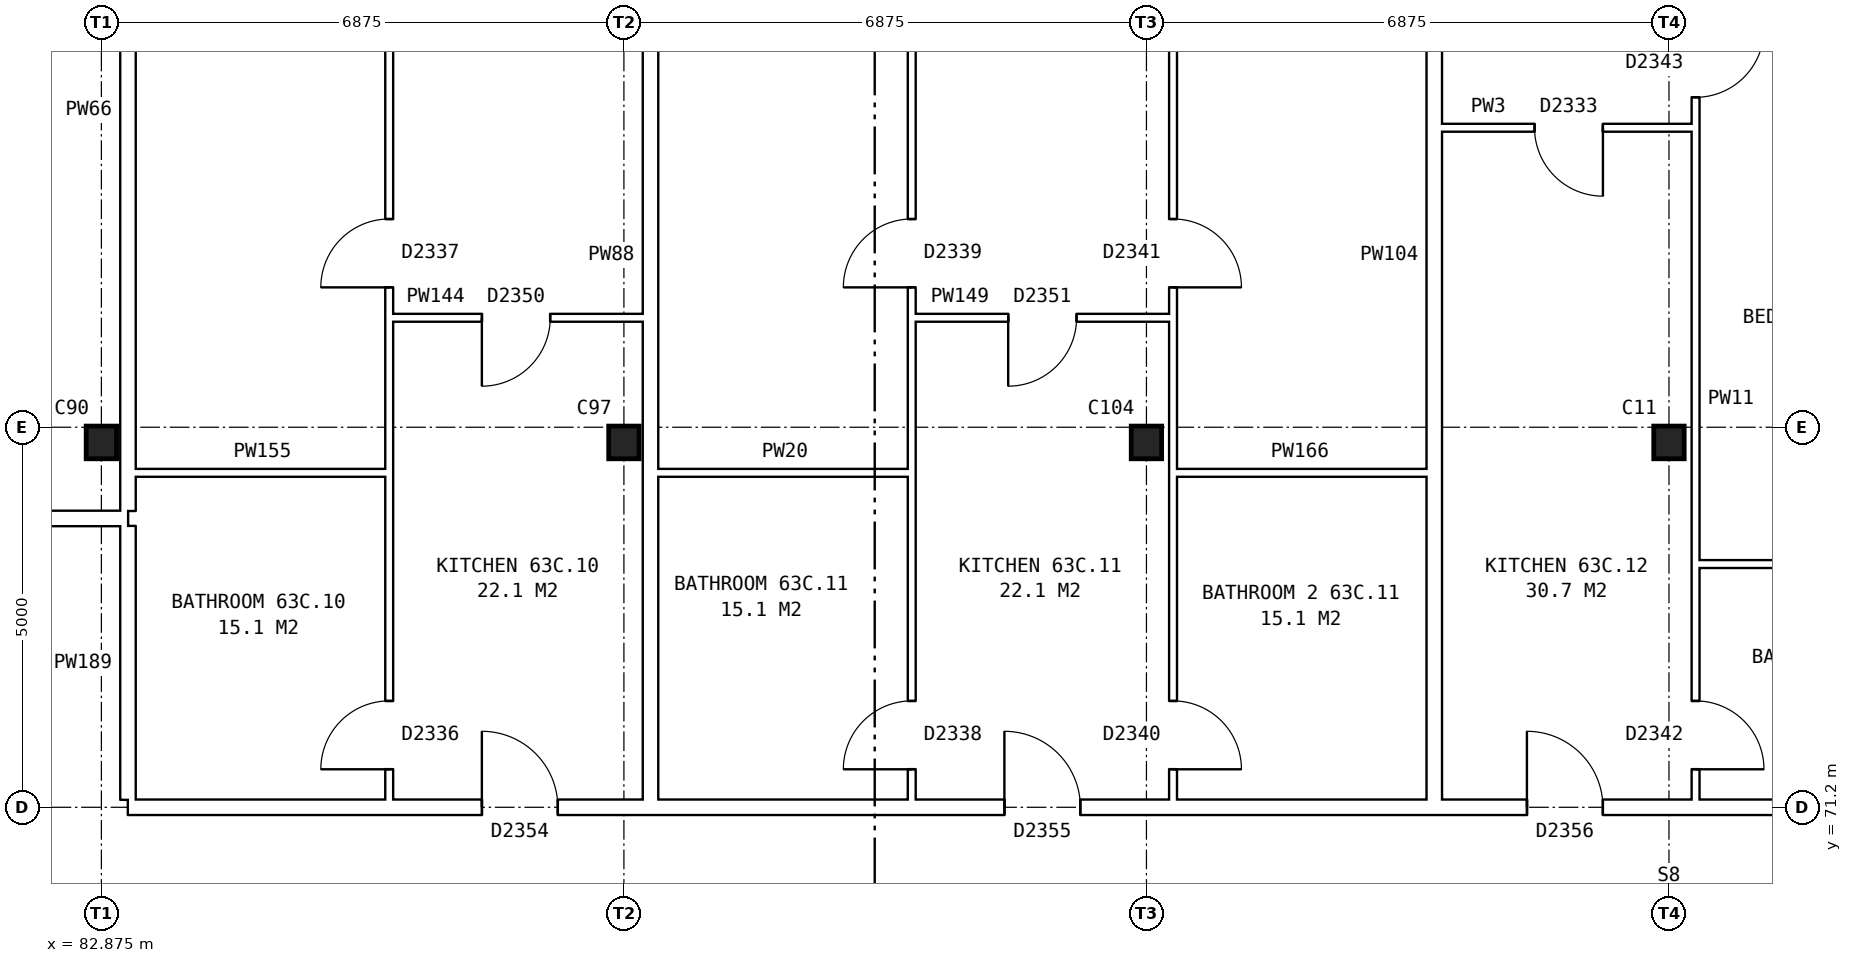
"""IFC4 building model, lengths in metres.
Left out: names, types, materials, properties, quantities, classifications, styles, units other than length and angle.
Written with IfcOpenShell. Run it as: python <this file> out.ifc"""

import sys

from ifc_helpers import new_model, si_unit, direction, frame, frame_2d, origin, origin_2d, place, context, subcontext, project, spatial, rectangle, i_section, extrude, element, fill, save


model = new_model("IFC4")
c1 = context("Model", 3, precision=1e-05, world=origin(), true_north=direction((0.0, 1.0)))
c2 = subcontext(c1, "Body", "Model", "MODEL_VIEW")
j1 = project(units=[si_unit("LENGTHUNIT", "METRE"), si_unit("PLANEANGLEUNIT", "RADIAN")], contexts=[c1])
p1 = place(None, origin())
s1 = spatial("IfcSite", under=j1, at=p1, CompositionType="ELEMENT")
p2 = place(p1, origin())
s2 = spatial("IfcBuilding", under=s1, at=p2, CompositionType="ELEMENT")
p3 = place(p2, frame((0.0, 0.0, 224.5)))
s3 = spatial("IfcBuildingStorey", under=s2, at=p3, CompositionType="ELEMENT", Elevation=224.5)
for number, where, z_axis, x_axis in (
    (1, (82.875, 76.0, 0.0), (0.0, 0.0, 1.0), (1.0, 0.0, 0.0)),
    (2, (89.75, 76.0, 0.0), (0.0, 0.0, 1.0), (1.0, 0.0, 0.0)),
    (3, (96.625, 76.0, 0.0), (0.0, 0.0, 1.0), (1.0, 0.0, 0.0)),
    (4, (103.5, 76.0, 0.0), (0.0, 0.0, 1.0), (1.0, 0.0, 0.0)),
):
    element("IfcColumn", number, at=place(p3, frame(where, z_axis=z_axis, x_axis=x_axis)), inside=s3, PredefinedType="COLUMN", context=c2, shape_type="SweptSolid", body=[
        extrude(i_section(OverallWidth=0.4, OverallDepth=0.43, WebThickness=0.04, FlangeThickness=0.04, at=origin_2d()), origin(), (0.0, 0.0, 1.0), 2.85),
    ])
p4 = place(p3, frame((83.225, 71.2, 0.0), z_axis=(0.0, 0.0, 1.0), x_axis=(1.0, 0.0, 0.0)))
e5 = element("IfcWall", 5, at=p4, inside=s3, PredefinedType="PARTITIONING", context=c2, shape_type="SweptSolid", body=[
    extrude(rectangle(XDim=41.25, YDim=0.2, at=frame_2d((20.625, 0.0))), origin(), (0.0, 0.0, 1.0), 2.85),
])
p5 = place(p4, frame((4.656, 0.0, 0.0)))
e6 = element("IfcOpeningElement", 6, at=p5, cuts=e5, PredefinedType="OPENING", context=c2, shape_type="SweptSolid", body=[
    extrude(rectangle(XDim=1.0, YDim=2.1, at=frame_2d((0.5, 1.05))), frame((0.0, 0.11, 0.0), z_axis=(0.0, -1.0, 0.0), x_axis=(1.0, 0.0, 0.0)), (0.0, 0.0, 1.0), 0.22),
])
p6 = place(p4, frame((11.531, 0.0, 0.0)))
e7 = element("IfcOpeningElement", 7, at=p6, cuts=e5, PredefinedType="OPENING", context=c2, shape_type="SweptSolid", body=[
    extrude(rectangle(XDim=1.0, YDim=2.1, at=frame_2d((0.5, 1.05))), frame((0.0, 0.11, 0.0), z_axis=(0.0, -1.0, 0.0), x_axis=(1.0, 0.0, 0.0)), (0.0, 0.0, 1.0), 0.22),
])
p7 = place(p4, frame((18.406, 0.0, 0.0)))
e8 = element("IfcOpeningElement", 8, at=p7, cuts=e5, PredefinedType="OPENING", context=c2, shape_type="SweptSolid", body=[
    extrude(rectangle(XDim=1.0, YDim=2.1, at=frame_2d((0.5, 1.05))), frame((0.0, 0.11, 0.0), z_axis=(0.0, -1.0, 0.0), x_axis=(1.0, 0.0, 0.0)), (0.0, 0.0, 1.0), 0.22),
])
p8 = place(p4, frame((28.719, 0.0, 0.0)))
e9 = element("IfcOpeningElement", 9, at=p8, cuts=e5, PredefinedType="OPENING", context=c2, shape_type="SweptSolid", body=[
    extrude(rectangle(XDim=1.0, YDim=2.1, at=frame_2d((0.5, 1.05))), frame((0.0, 0.11, 0.0), z_axis=(0.0, -1.0, 0.0), x_axis=(1.0, 0.0, 0.0)), (0.0, 0.0, 1.0), 0.22),
])
p9 = place(p4, frame((35.594, 0.0, 0.0)))
e10 = element("IfcOpeningElement", 10, at=p9, cuts=e5, PredefinedType="OPENING", context=c2, shape_type="SweptSolid", body=[
    extrude(rectangle(XDim=1.0, YDim=2.1, at=frame_2d((0.5, 1.05))), frame((0.0, 0.11, 0.0), z_axis=(0.0, -1.0, 0.0), x_axis=(1.0, 0.0, 0.0)), (0.0, 0.0, 1.0), 0.22),
])
p10 = place(p3, frame((103.85, 74.4, 0.0), z_axis=(0.0, 0.0, 1.0), x_axis=(1.0, 0.0, 0.0)))
e11 = element("IfcWall", 11, at=p10, inside=s3, PredefinedType="PARTITIONING", context=c2, shape_type="SweptSolid", body=[
    extrude(rectangle(XDim=6.875, YDim=0.1, at=frame_2d((3.438, 0.0))), origin(), (0.0, 0.0, 1.0), 2.85),
])
p11 = place(p3, frame((75.64, 75.0, 0.0), z_axis=(0.0, 0.0, 1.0), x_axis=(1.0, 0.0, 0.0)))
e12 = element("IfcWall", 12, at=p11, inside=s3, PredefinedType="PARTITIONING", context=c2, shape_type="SweptSolid", body=[
    extrude(rectangle(XDim=7.585, YDim=0.2, at=frame_2d((3.792, 0.0))), origin(), (0.0, 0.0, 1.0), 2.85),
])
p12 = place(p11, frame((3.343, 0.0, 0.0)))
e13 = element("IfcOpeningElement", 13, at=p12, cuts=e12, PredefinedType="OPENING", context=c2, shape_type="SweptSolid", body=[
    extrude(rectangle(XDim=0.9, YDim=2.1, at=frame_2d((0.45, 1.05))), frame((0.0, 0.11, 0.0), z_axis=(0.0, -1.0, 0.0), x_axis=(1.0, 0.0, 0.0)), (0.0, 0.0, 1.0), 0.22),
])
for number, where, z_axis, x_axis in (
    (14, (83.325, 75.6, 0.0), (0.0, 0.0, 1.0), (1.0, 0.0, 0.0)),
    (15, (90.2, 75.6, 0.0), (0.0, 0.0, 1.0), (1.0, 0.0, 0.0)),
):
    element("IfcWall", number, at=place(p3, frame(where, z_axis=z_axis, x_axis=x_axis)), inside=s3, PredefinedType="PARTITIONING", context=c2, shape_type="SweptSolid", body=[
        extrude(rectangle(XDim=3.337, YDim=0.1, at=frame_2d((1.668, 0.0))), origin(), (0.0, 0.0, 1.0), 2.85),
    ])
p13 = place(p3, frame((96.975, 75.6, 0.0), z_axis=(0.0, 0.0, 1.0), x_axis=(1.0, 0.0, 0.0)))
e16 = element("IfcWall", 16, at=p13, inside=s3, PredefinedType="PARTITIONING", context=c2, shape_type="SweptSolid", body=[
    extrude(rectangle(XDim=3.337, YDim=0.1, at=frame_2d((1.668, 0.0))), origin(), (0.0, 0.0, 1.0), 2.85),
])
p14 = place(p3, frame((86.662, 77.64, 0.0), z_axis=(0.0, 0.0, 1.0), x_axis=(1.0, 0.0, 0.0)))
e17 = element("IfcWall", 17, at=p14, inside=s3, PredefinedType="PARTITIONING", context=c2, shape_type="SweptSolid", body=[
    extrude(rectangle(XDim=3.338, YDim=0.1, at=frame_2d((1.669, 0.0))), origin(), (0.0, 0.0, 1.0), 2.85),
])
p15 = place(p14, frame((1.219, 0.0, 0.0)))
e18 = element("IfcOpeningElement", 18, at=p15, cuts=e17, PredefinedType="OPENING", context=c2, shape_type="SweptSolid", body=[
    extrude(rectangle(XDim=0.9, YDim=2.1, at=frame_2d((0.45, 1.05))), frame((0.0, 0.06, 0.0), z_axis=(0.0, -1.0, 0.0), x_axis=(1.0, 0.0, 0.0)), (0.0, 0.0, 1.0), 0.12),
])
p16 = place(p3, frame((93.537, 77.64, 0.0), z_axis=(0.0, 0.0, 1.0), x_axis=(1.0, 0.0, 0.0)))
e19 = element("IfcWall", 19, at=p16, inside=s3, PredefinedType="PARTITIONING", context=c2, shape_type="SweptSolid", body=[
    extrude(rectangle(XDim=3.438, YDim=0.1, at=frame_2d((1.719, 0.0))), origin(), (0.0, 0.0, 1.0), 2.85),
])
p17 = place(p16, frame((1.269, 0.0, 0.0)))
e20 = element("IfcOpeningElement", 20, at=p17, cuts=e19, PredefinedType="OPENING", context=c2, shape_type="SweptSolid", body=[
    extrude(rectangle(XDim=0.9, YDim=2.1, at=frame_2d((0.45, 1.05))), frame((0.0, 0.06, 0.0), z_axis=(0.0, -1.0, 0.0), x_axis=(1.0, 0.0, 0.0)), (0.0, 0.0, 1.0), 0.12),
])
p18 = place(p3, frame((100.512, 80.14, 0.0), z_axis=(0.0, 0.0, 1.0), x_axis=(1.0, 0.0, 0.0)))
e21 = element("IfcWall", 21, at=p18, inside=s3, PredefinedType="PARTITIONING", context=c2, shape_type="SweptSolid", body=[
    extrude(rectangle(XDim=3.338, YDim=0.1, at=frame_2d((1.669, 0.0))), origin(), (0.0, 0.0, 1.0), 2.85),
])
p19 = place(p18, frame((1.219, 0.0, 0.0)))
e22 = element("IfcOpeningElement", 22, at=p19, cuts=e21, PredefinedType="OPENING", context=c2, shape_type="SweptSolid", body=[
    extrude(rectangle(XDim=0.9, YDim=2.1, at=frame_2d((0.45, 1.05))), frame((0.0, 0.06, 0.0), z_axis=(0.0, -1.0, 0.0), x_axis=(1.0, 0.0, 0.0)), (0.0, 0.0, 1.0), 0.12),
])
p20 = place(p3, frame((83.225, 71.3, 0.0), z_axis=(0.0, 0.0, 1.0), x_axis=(0.0, 1.0, 0.0)))
e23 = element("IfcWall", 23, at=p20, inside=s3, PredefinedType="PARTITIONING", context=c2, shape_type="SweptSolid", body=[
    extrude(rectangle(XDim=3.6, YDim=0.2, at=frame_2d((1.8, 0.0))), origin(), (0.0, 0.0, 1.0), 2.85),
])
p21 = place(p3, frame((83.225, 75.1, 0.0), z_axis=(0.0, 0.0, 1.0), x_axis=(0.0, 1.0, 0.0)))
e24 = element("IfcWall", 24, at=p21, inside=s3, PredefinedType="PARTITIONING", context=c2, shape_type="SweptSolid", body=[
    extrude(rectangle(XDim=10.54, YDim=0.2, at=frame_2d((5.27, 0.0))), origin(), (0.0, 0.0, 1.0), 2.85),
])
p22 = place(p3, frame((86.662, 71.3, 0.0), z_axis=(0.0, 0.0, 1.0), x_axis=(0.0, 1.0, 0.0)))
e25 = element("IfcWall", 25, at=p22, inside=s3, PredefinedType="PARTITIONING", context=c2, shape_type="SweptSolid", body=[
    extrude(rectangle(XDim=14.34, YDim=0.1, at=frame_2d((7.17, 0.0))), origin(), (0.0, 0.0, 1.0), 2.85),
])
p23 = place(p22, frame((6.74, 0.0, 0.0)))
e26 = element("IfcOpeningElement", 26, at=p23, cuts=e25, PredefinedType="OPENING", context=c2, shape_type="SweptSolid", body=[
    extrude(rectangle(XDim=0.9, YDim=2.1, at=frame_2d((0.45, 1.05))), frame((0.0, 0.06, 0.0), z_axis=(0.0, -1.0, 0.0), x_axis=(1.0, 0.0, 0.0)), (0.0, 0.0, 1.0), 0.12),
])
p24 = place(p22, frame((0.4, 0.0, 0.0)))
e27 = element("IfcOpeningElement", 27, at=p24, cuts=e25, PredefinedType="OPENING", context=c2, shape_type="SweptSolid", body=[
    extrude(rectangle(XDim=0.9, YDim=2.1, at=frame_2d((0.45, 1.05))), frame((0.0, 0.06, 0.0), z_axis=(0.0, -1.0, 0.0), x_axis=(1.0, 0.0, 0.0)), (0.0, 0.0, 1.0), 0.12),
])
p25 = place(p3, frame((90.1, 71.3, 0.0), z_axis=(0.0, 0.0, 1.0), x_axis=(0.0, 1.0, 0.0)))
e28 = element("IfcWall", 28, at=p25, inside=s3, PredefinedType="PARTITIONING", context=c2, shape_type="SweptSolid", body=[
    extrude(rectangle(XDim=14.34, YDim=0.2, at=frame_2d((7.17, 0.0))), origin(), (0.0, 0.0, 1.0), 2.85),
])
p26 = place(p3, frame((93.537, 71.3, 0.0), z_axis=(0.0, 0.0, 1.0), x_axis=(0.0, 1.0, 0.0)))
e29 = element("IfcWall", 29, at=p26, inside=s3, PredefinedType="PARTITIONING", context=c2, shape_type="SweptSolid", body=[
    extrude(rectangle(XDim=14.34, YDim=0.1, at=frame_2d((7.17, 0.0))), origin(), (0.0, 0.0, 1.0), 2.85),
])
p27 = place(p26, frame((6.74, 0.0, 0.0)))
e30 = element("IfcOpeningElement", 30, at=p27, cuts=e29, PredefinedType="OPENING", context=c2, shape_type="SweptSolid", body=[
    extrude(rectangle(XDim=0.9, YDim=2.1, at=frame_2d((0.45, 1.05))), frame((0.0, 0.06, 0.0), z_axis=(0.0, -1.0, 0.0), x_axis=(1.0, 0.0, 0.0)), (0.0, 0.0, 1.0), 0.12),
])
p28 = place(p26, frame((0.4, 0.0, 0.0)))
e31 = element("IfcOpeningElement", 31, at=p28, cuts=e29, PredefinedType="OPENING", context=c2, shape_type="SweptSolid", body=[
    extrude(rectangle(XDim=0.9, YDim=2.1, at=frame_2d((0.45, 1.05))), frame((0.0, 0.06, 0.0), z_axis=(0.0, -1.0, 0.0), x_axis=(1.0, 0.0, 0.0)), (0.0, 0.0, 1.0), 0.12),
])
p29 = place(p3, frame((96.975, 71.3, 0.0), z_axis=(0.0, 0.0, 1.0), x_axis=(0.0, 1.0, 0.0)))
e32 = element("IfcWall", 32, at=p29, inside=s3, PredefinedType="PARTITIONING", context=c2, shape_type="SweptSolid", body=[
    extrude(rectangle(XDim=14.34, YDim=0.1, at=frame_2d((7.17, 0.0))), origin(), (0.0, 0.0, 1.0), 2.85),
])
p30 = place(p29, frame((6.74, 0.0, 0.0)))
e33 = element("IfcOpeningElement", 33, at=p30, cuts=e32, PredefinedType="OPENING", context=c2, shape_type="SweptSolid", body=[
    extrude(rectangle(XDim=0.9, YDim=2.1, at=frame_2d((0.45, 1.05))), frame((0.0, 0.06, 0.0), z_axis=(0.0, -1.0, 0.0), x_axis=(1.0, 0.0, 0.0)), (0.0, 0.0, 1.0), 0.12),
])
p31 = place(p29, frame((0.4, 0.0, 0.0)))
e34 = element("IfcOpeningElement", 34, at=p31, cuts=e32, PredefinedType="OPENING", context=c2, shape_type="SweptSolid", body=[
    extrude(rectangle(XDim=0.9, YDim=2.1, at=frame_2d((0.45, 1.05))), frame((0.0, 0.06, 0.0), z_axis=(0.0, -1.0, 0.0), x_axis=(1.0, 0.0, 0.0)), (0.0, 0.0, 1.0), 0.12),
])
p32 = place(p3, frame((100.412, 71.3, 0.0), z_axis=(0.0, 0.0, 1.0), x_axis=(0.0, 1.0, 0.0)))
e35 = element("IfcWall", 35, at=p32, inside=s3, PredefinedType="PARTITIONING", context=c2, shape_type="SweptSolid", body=[
    extrude(rectangle(XDim=14.34, YDim=0.2, at=frame_2d((7.17, 0.0))), origin(), (0.0, 0.0, 1.0), 2.85),
])
p33 = place(p3, frame((103.85, 71.3, 0.0), z_axis=(0.0, 0.0, 1.0), x_axis=(0.0, 1.0, 0.0)))
e36 = element("IfcWall", 36, at=p33, inside=s3, PredefinedType="PARTITIONING", context=c2, shape_type="SweptSolid", body=[
    extrude(rectangle(XDim=14.34, YDim=0.1, at=frame_2d((7.17, 0.0))), origin(), (0.0, 0.0, 1.0), 2.85),
])
p34 = place(p33, frame((9.24, 0.0, 0.0)))
e37 = element("IfcOpeningElement", 37, at=p34, cuts=e36, PredefinedType="OPENING", context=c2, shape_type="SweptSolid", body=[
    extrude(rectangle(XDim=0.9, YDim=2.1, at=frame_2d((0.45, 1.05))), frame((0.0, 0.06, 0.0), z_axis=(0.0, -1.0, 0.0), x_axis=(1.0, 0.0, 0.0)), (0.0, 0.0, 1.0), 0.12),
])
p35 = place(p33, frame((0.4, 0.0, 0.0)))
e38 = element("IfcOpeningElement", 38, at=p35, cuts=e36, PredefinedType="OPENING", context=c2, shape_type="SweptSolid", body=[
    extrude(rectangle(XDim=0.9, YDim=2.1, at=frame_2d((0.45, 1.05))), frame((0.0, 0.06, 0.0), z_axis=(0.0, -1.0, 0.0), x_axis=(1.0, 0.0, 0.0)), (0.0, 0.0, 1.0), 0.12),
])
p36 = place(p23, origin())
e39 = element("IfcDoor", 39, at=p36, inside=s3, OperationType="SINGLE_SWING_LEFT", PredefinedType="DOOR", context=c2, shape_type="SweptSolid", body=[
    extrude(rectangle(XDim=0.9, YDim=2.1, at=frame_2d((0.45, 1.05))), frame((0.0, 0.025, 0.0), z_axis=(0.0, -1.0, 0.0), x_axis=(1.0, 0.0, 0.0)), (0.0, 0.0, 1.0), 0.05),
])
fill(e26, e39)
p37 = place(p5, origin())
e40 = element("IfcDoor", 40, at=p37, inside=s3, OperationType="SINGLE_SWING_LEFT", PredefinedType="DOOR", context=c2, shape_type="SweptSolid", body=[
    extrude(rectangle(XDim=1.0, YDim=2.1, at=frame_2d((0.5, 1.05))), frame((0.0, 0.025, 0.0), z_axis=(0.0, -1.0, 0.0), x_axis=(1.0, 0.0, 0.0)), (0.0, 0.0, 1.0), 0.05),
])
fill(e6, e40)
p38 = place(p15, frame((0.9, 0.0, 0.0), z_axis=(0.0, 0.0, 1.0), x_axis=(-1.0, 0.0, 0.0)))
e41 = element("IfcDoor", 41, at=p38, inside=s3, OperationType="SINGLE_SWING_RIGHT", PredefinedType="DOOR", context=c2, shape_type="SweptSolid", body=[
    extrude(rectangle(XDim=0.9, YDim=2.1, at=frame_2d((0.45, 1.05))), frame((0.0, 0.025, 0.0), z_axis=(0.0, -1.0, 0.0), x_axis=(1.0, 0.0, 0.0)), (0.0, 0.0, 1.0), 0.05),
])
fill(e18, e41)
p39 = place(p24, origin())
e42 = element("IfcDoor", 42, at=p39, inside=s3, OperationType="SINGLE_SWING_LEFT", PredefinedType="DOOR", context=c2, shape_type="SweptSolid", body=[
    extrude(rectangle(XDim=0.9, YDim=2.1, at=frame_2d((0.45, 1.05))), frame((0.0, 0.025, 0.0), z_axis=(0.0, -1.0, 0.0), x_axis=(1.0, 0.0, 0.0)), (0.0, 0.0, 1.0), 0.05),
])
fill(e27, e42)
p40 = place(p27, origin())
e43 = element("IfcDoor", 43, at=p40, inside=s3, OperationType="SINGLE_SWING_LEFT", PredefinedType="DOOR", context=c2, shape_type="SweptSolid", body=[
    extrude(rectangle(XDim=0.9, YDim=2.1, at=frame_2d((0.45, 1.05))), frame((0.0, 0.025, 0.0), z_axis=(0.0, -1.0, 0.0), x_axis=(1.0, 0.0, 0.0)), (0.0, 0.0, 1.0), 0.05),
])
fill(e30, e43)
p41 = place(p30, frame((0.9, 0.0, 0.0), z_axis=(0.0, 0.0, 1.0), x_axis=(-1.0, 0.0, 0.0)))
e44 = element("IfcDoor", 44, at=p41, inside=s3, OperationType="SINGLE_SWING_RIGHT", PredefinedType="DOOR", context=c2, shape_type="SweptSolid", body=[
    extrude(rectangle(XDim=0.9, YDim=2.1, at=frame_2d((0.45, 1.05))), frame((0.0, 0.025, 0.0), z_axis=(0.0, -1.0, 0.0), x_axis=(1.0, 0.0, 0.0)), (0.0, 0.0, 1.0), 0.05),
])
fill(e33, e44)
p42 = place(p6, origin())
e45 = element("IfcDoor", 45, at=p42, inside=s3, OperationType="SINGLE_SWING_LEFT", PredefinedType="DOOR", context=c2, shape_type="SweptSolid", body=[
    extrude(rectangle(XDim=1.0, YDim=2.1, at=frame_2d((0.5, 1.05))), frame((0.0, 0.025, 0.0), z_axis=(0.0, -1.0, 0.0), x_axis=(1.0, 0.0, 0.0)), (0.0, 0.0, 1.0), 0.05),
])
fill(e7, e45)
p43 = place(p17, frame((0.9, 0.0, 0.0), z_axis=(0.0, 0.0, 1.0), x_axis=(-1.0, 0.0, 0.0)))
e46 = element("IfcDoor", 46, at=p43, inside=s3, OperationType="SINGLE_SWING_RIGHT", PredefinedType="DOOR", context=c2, shape_type="SweptSolid", body=[
    extrude(rectangle(XDim=0.9, YDim=2.1, at=frame_2d((0.45, 1.05))), frame((0.0, 0.025, 0.0), z_axis=(0.0, -1.0, 0.0), x_axis=(1.0, 0.0, 0.0)), (0.0, 0.0, 1.0), 0.05),
])
fill(e20, e46)
p44 = place(p28, origin())
e47 = element("IfcDoor", 47, at=p44, inside=s3, OperationType="SINGLE_SWING_LEFT", PredefinedType="DOOR", context=c2, shape_type="SweptSolid", body=[
    extrude(rectangle(XDim=0.9, YDim=2.1, at=frame_2d((0.45, 1.05))), frame((0.0, 0.025, 0.0), z_axis=(0.0, -1.0, 0.0), x_axis=(1.0, 0.0, 0.0)), (0.0, 0.0, 1.0), 0.05),
])
fill(e31, e47)
p45 = place(p31, frame((0.9, 0.0, 0.0), z_axis=(0.0, 0.0, 1.0), x_axis=(-1.0, 0.0, 0.0)))
e48 = element("IfcDoor", 48, at=p45, inside=s3, OperationType="SINGLE_SWING_RIGHT", PredefinedType="DOOR", context=c2, shape_type="SweptSolid", body=[
    extrude(rectangle(XDim=0.9, YDim=2.1, at=frame_2d((0.45, 1.05))), frame((0.0, 0.025, 0.0), z_axis=(0.0, -1.0, 0.0), x_axis=(1.0, 0.0, 0.0)), (0.0, 0.0, 1.0), 0.05),
])
fill(e34, e48)
p46 = place(p34, frame((0.9, 0.0, 0.0), z_axis=(0.0, 0.0, 1.0), x_axis=(-1.0, 0.0, 0.0)))
e49 = element("IfcDoor", 49, at=p46, inside=s3, OperationType="SINGLE_SWING_LEFT", PredefinedType="DOOR", context=c2, shape_type="SweptSolid", body=[
    extrude(rectangle(XDim=0.9, YDim=2.1, at=frame_2d((0.45, 1.05))), frame((0.0, 0.025, 0.0), z_axis=(0.0, -1.0, 0.0), x_axis=(1.0, 0.0, 0.0)), (0.0, 0.0, 1.0), 0.05),
])
fill(e37, e49)
p47 = place(p7, origin())
e50 = element("IfcDoor", 50, at=p47, inside=s3, OperationType="SINGLE_SWING_LEFT", PredefinedType="DOOR", context=c2, shape_type="SweptSolid", body=[
    extrude(rectangle(XDim=1.0, YDim=2.1, at=frame_2d((0.5, 1.05))), frame((0.0, 0.025, 0.0), z_axis=(0.0, -1.0, 0.0), x_axis=(1.0, 0.0, 0.0)), (0.0, 0.0, 1.0), 0.05),
])
fill(e8, e50)
p48 = place(p19, frame((0.9, 0.0, 0.0), z_axis=(0.0, 0.0, 1.0), x_axis=(-1.0, 0.0, 0.0)))
e51 = element("IfcDoor", 51, at=p48, inside=s3, OperationType="SINGLE_SWING_LEFT", PredefinedType="DOOR", context=c2, shape_type="SweptSolid", body=[
    extrude(rectangle(XDim=0.9, YDim=2.1, at=frame_2d((0.45, 1.05))), frame((0.0, 0.025, 0.0), z_axis=(0.0, -1.0, 0.0), x_axis=(1.0, 0.0, 0.0)), (0.0, 0.0, 1.0), 0.05),
])
fill(e22, e51)
p49 = place(p35, frame((0.9, 0.0, 0.0), z_axis=(0.0, 0.0, 1.0), x_axis=(-1.0, 0.0, 0.0)))
e52 = element("IfcDoor", 52, at=p49, inside=s3, OperationType="SINGLE_SWING_RIGHT", PredefinedType="DOOR", context=c2, shape_type="SweptSolid", body=[
    extrude(rectangle(XDim=0.9, YDim=2.1, at=frame_2d((0.45, 1.05))), frame((0.0, 0.025, 0.0), z_axis=(0.0, -1.0, 0.0), x_axis=(1.0, 0.0, 0.0)), (0.0, 0.0, 1.0), 0.05),
])
fill(e38, e52)
save(model, sys.argv[1])
